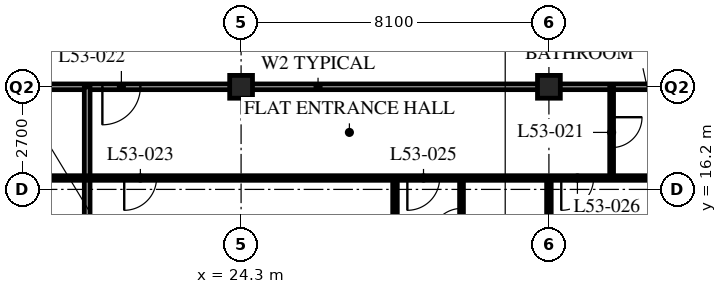
"""IFC4 building model, lengths in metres.
Left out: names, types, materials, properties, quantities, classifications, styles, units other than length and angle.
Written with IfcOpenShell. Run it as: python <this file> out.ifc"""

import sys

from ifc_helpers import new_model, si_unit, direction, frame, frame_2d, origin, origin_2d, place, context, subcontext, project, spatial, rectangle, hollow_rectangle, extrude, element, fill, save


model = new_model("IFC4")
c1 = context("Model", 3, precision=1e-05, world=origin(), true_north=direction((0.0, 1.0)))
c2 = subcontext(c1, "Body", "Model", "MODEL_VIEW")
j1 = project(units=[si_unit("LENGTHUNIT", "METRE"), si_unit("PLANEANGLEUNIT", "RADIAN")], contexts=[c1])
p1 = place(None, origin())
s1 = spatial("IfcSite", under=j1, at=p1, CompositionType="ELEMENT")
p2 = place(p1, origin())
s2 = spatial("IfcBuilding", under=s1, at=p2, CompositionType="ELEMENT")
p3 = place(p2, frame((0.0, 0.0, 206.4)))
s3 = spatial("IfcBuildingStorey", under=s2, at=p3, CompositionType="ELEMENT", Elevation=206.4)
for number, where, z_axis, x_axis in (
    (1, (24.3, 18.9, 0.0), (0.0, 0.0, 1.0), (1.0, 0.0, 0.0)),
    (2, (32.4, 18.9, 0.0), (0.0, 0.0, 1.0), (1.0, 0.0, 0.0)),
):
    element("IfcColumn", number, at=place(p3, frame(where, z_axis=z_axis, x_axis=x_axis)), inside=s3, PredefinedType="COLUMN", context=c2, shape_type="SweptSolid", body=[
        extrude(hollow_rectangle(XDim=0.6, YDim=0.6, WallThickness=0.05, at=origin_2d()), origin(), (0.0, 0.0, 1.0), 3.6),
    ])
p4 = place(p3, frame((8.1, 18.9, 0.0), z_axis=(0.0, 0.0, 1.0), x_axis=(1.0, 0.0, 0.0)))
e3 = element("IfcWall", 3, at=p4, inside=s3, PredefinedType="PARTITIONING", context=c2, shape_type="SweptSolid", body=[
    extrude(rectangle(XDim=36.45, YDim=0.15, at=frame_2d((18.225, 0.0))), origin(), (0.0, 0.0, 1.0), 2.778),
])
p5 = place(p4, frame((4.45, 0.0, 0.0)))
e4 = element("IfcOpeningElement", 4, at=p5, cuts=e3, PredefinedType="OPENING", context=c2, shape_type="SweptSolid", body=[
    extrude(rectangle(XDim=1.0, YDim=2.1, at=frame_2d((0.5, 1.05))), frame((0.0, 0.085, 0.0), z_axis=(0.0, -1.0, 0.0), x_axis=(1.0, 0.0, 0.0)), (0.0, 0.0, 1.0), 0.17),
])
p6 = place(p4, frame((12.55, 0.0, 0.0)))
e5 = element("IfcOpeningElement", 5, at=p6, cuts=e3, PredefinedType="OPENING", context=c2, shape_type="SweptSolid", body=[
    extrude(rectangle(XDim=1.0, YDim=2.1, at=frame_2d((0.5, 1.05))), frame((0.0, 0.085, 0.0), z_axis=(0.0, -1.0, 0.0), x_axis=(1.0, 0.0, 0.0)), (0.0, 0.0, 1.0), 0.17),
])
p7 = place(p4, frame((29.05, 0.0, 0.0)))
e6 = element("IfcOpeningElement", 6, at=p7, cuts=e3, PredefinedType="OPENING", context=c2, shape_type="SweptSolid", body=[
    extrude(rectangle(XDim=1.0, YDim=2.1, at=frame_2d((0.5, 1.05))), frame((0.0, 0.085, 0.0), z_axis=(0.0, -1.0, 0.0), x_axis=(1.0, 0.0, 0.0)), (0.0, 0.0, 1.0), 0.17),
])
p8 = place(p4, frame((2.625, 0.0, 0.0)))
e7 = element("IfcOpeningElement", 7, at=p8, cuts=e3, PredefinedType="OPENING", context=c2, shape_type="SweptSolid", body=[
    extrude(rectangle(XDim=1.0, YDim=2.1, at=frame_2d((0.5, 1.05))), frame((0.0, 0.085, 0.0), z_axis=(0.0, -1.0, 0.0), x_axis=(1.0, 0.0, 0.0)), (0.0, 0.0, 1.0), 0.17),
])
p9 = place(p4, frame((33.925, 0.0, 0.0)))
e8 = element("IfcOpeningElement", 8, at=p9, cuts=e3, PredefinedType="OPENING", context=c2, shape_type="SweptSolid", body=[
    extrude(rectangle(XDim=1.0, YDim=2.1, at=frame_2d((0.5, 1.05))), frame((0.0, 0.085, 0.0), z_axis=(0.0, -1.0, 0.0), x_axis=(1.0, 0.0, 0.0)), (0.0, 0.0, 1.0), 0.17),
])
p10 = place(p3, frame((20.25, 18.9, 0.0), z_axis=(0.0, 0.0, 1.0), x_axis=(0.0, -1.0, 0.0)))
e9 = element("IfcWall", 9, at=p10, inside=s3, PredefinedType="PARTITIONING", context=c2, shape_type="SweptSolid", body=[
    extrude(rectangle(XDim=7.8, YDim=0.15, at=frame_2d((3.9, 0.0))), origin(), (0.0, 0.0, 1.0), 3.39),
])
p11 = place(p3, frame((34.05, 18.9, 0.0), z_axis=(0.0, 0.0, 1.0), x_axis=(0.0, -1.0, 0.0)))
e10 = element("IfcWall", 10, at=p11, inside=s3, PredefinedType="PARTITIONING", context=c2, shape_type="SweptSolid", body=[
    extrude(rectangle(XDim=2.4, YDim=0.1, at=frame_2d((1.2, 0.0))), origin(), (0.0, 0.0, 1.0), 3.39),
])
p12 = place(p11, frame((0.8, 0.0, 0.0)))
e11 = element("IfcOpeningElement", 11, at=p12, cuts=e10, PredefinedType="OPENING", context=c2, shape_type="SweptSolid", body=[
    extrude(rectangle(XDim=0.8, YDim=2.1, at=frame_2d((0.4, 1.05))), frame((0.0, 0.06, 0.0), z_axis=(0.0, -1.0, 0.0), x_axis=(1.0, 0.0, 0.0)), (0.0, 0.0, 1.0), 0.12),
])
p13 = place(p3, frame((30.1, 16.5, 0.0), z_axis=(0.0, 0.0, 1.0), x_axis=(0.0, -1.0, 0.0)))
e12 = element("IfcWall", 12, at=p13, inside=s3, PredefinedType="PARTITIONING", context=c2, shape_type="SweptSolid", body=[
    extrude(rectangle(XDim=2.4, YDim=0.1, at=frame_2d((1.2, 0.0))), origin(), (0.0, 0.0, 1.0), 3.39),
])
p14 = place(p13, frame((0.8, 0.0, 0.0)))
e13 = element("IfcOpeningElement", 13, at=p14, cuts=e12, PredefinedType="OPENING", context=c2, shape_type="SweptSolid", body=[
    extrude(rectangle(XDim=0.8, YDim=2.1, at=frame_2d((0.4, 1.05))), frame((0.0, 0.06, 0.0), z_axis=(0.0, -1.0, 0.0), x_axis=(1.0, 0.0, 0.0)), (0.0, 0.0, 1.0), 0.12),
])
p15 = place(p3, frame((28.35, 16.5, 0.0), z_axis=(0.0, 0.0, 1.0), x_axis=(0.0, -1.0, 0.0)))
e14 = element("IfcWall", 14, at=p15, inside=s3, PredefinedType="PARTITIONING", context=c2, shape_type="SweptSolid", body=[
    extrude(rectangle(XDim=5.4, YDim=0.12, at=frame_2d((2.7, 0.0))), origin(), (0.0, 0.0, 1.0), 3.39),
])
p16 = place(p3, frame((32.4, 16.5, 0.0), z_axis=(0.0, 0.0, 1.0), x_axis=(0.0, -1.0, 0.0)))
e15 = element("IfcWall", 15, at=p16, inside=s3, PredefinedType="PARTITIONING", context=c2, shape_type="SweptSolid", body=[
    extrude(rectangle(XDim=5.4, YDim=0.12, at=frame_2d((2.7, 0.0))), origin(), (0.0, 0.0, 1.0), 2.778),
])
p17 = place(p3, frame((8.1, 16.5, 0.0), z_axis=(0.0, 0.0, 1.0), x_axis=(1.0, 0.0, 0.0)))
e16 = element("IfcWall", 16, at=p17, inside=s3, PredefinedType="PARTITIONING", context=c2, shape_type="SweptSolid", body=[
    extrude(rectangle(XDim=28.35, YDim=0.12, at=frame_2d((14.175, 0.0))), origin(), (0.0, 0.0, 1.0), 3.39),
])
p18 = place(p17, frame((5.025, 0.0, 0.0)))
e17 = element("IfcOpeningElement", 17, at=p18, cuts=e16, PredefinedType="OPENING", context=c2, shape_type="SweptSolid", body=[
    extrude(rectangle(XDim=0.85, YDim=2.1, at=frame_2d((0.425, 1.05))), frame((0.0, 0.07, 0.0), z_axis=(0.0, -1.0, 0.0), x_axis=(1.0, 0.0, 0.0)), (0.0, 0.0, 1.0), 0.14),
])
p19 = place(p17, frame((8.425, 0.0, 0.0)))
e18 = element("IfcOpeningElement", 18, at=p19, cuts=e16, PredefinedType="OPENING", context=c2, shape_type="SweptSolid", body=[
    extrude(rectangle(XDim=0.85, YDim=2.1, at=frame_2d((0.425, 1.05))), frame((0.0, 0.07, 0.0), z_axis=(0.0, -1.0, 0.0), x_axis=(1.0, 0.0, 0.0)), (0.0, 0.0, 1.0), 0.14),
])
p20 = place(p17, frame((13.125, 0.0, 0.0)))
e19 = element("IfcOpeningElement", 19, at=p20, cuts=e16, PredefinedType="OPENING", context=c2, shape_type="SweptSolid", body=[
    extrude(rectangle(XDim=0.85, YDim=2.1, at=frame_2d((0.425, 1.05))), frame((0.0, 0.07, 0.0), z_axis=(0.0, -1.0, 0.0), x_axis=(1.0, 0.0, 0.0)), (0.0, 0.0, 1.0), 0.14),
])
p21 = place(p17, frame((20.575, 0.0, 0.0)))
e20 = element("IfcOpeningElement", 20, at=p21, cuts=e16, PredefinedType="OPENING", context=c2, shape_type="SweptSolid", body=[
    extrude(rectangle(XDim=0.85, YDim=2.1, at=frame_2d((0.425, 1.05))), frame((0.0, 0.07, 0.0), z_axis=(0.0, -1.0, 0.0), x_axis=(1.0, 0.0, 0.0)), (0.0, 0.0, 1.0), 0.14),
])
p22 = place(p17, frame((24.625, 0.0, 0.0)))
e21 = element("IfcOpeningElement", 21, at=p22, cuts=e16, PredefinedType="OPENING", context=c2, shape_type="SweptSolid", body=[
    extrude(rectangle(XDim=0.85, YDim=2.1, at=frame_2d((0.425, 1.05))), frame((0.0, 0.07, 0.0), z_axis=(0.0, -1.0, 0.0), x_axis=(1.0, 0.0, 0.0)), (0.0, 0.0, 1.0), 0.14),
])
p23 = place(p17, frame((2.725, 0.0, 0.0)))
e22 = element("IfcOpeningElement", 22, at=p23, cuts=e16, PredefinedType="OPENING", context=c2, shape_type="SweptSolid", body=[
    extrude(rectangle(XDim=0.85, YDim=2.1, at=frame_2d((0.425, 1.05))), frame((0.0, 0.07, 0.0), z_axis=(0.0, -1.0, 0.0), x_axis=(1.0, 0.0, 0.0)), (0.0, 0.0, 1.0), 0.14),
])
p24 = place(p12, origin())
e23 = element("IfcDoor", 23, at=p24, inside=s3, OperationType="SINGLE_SWING_LEFT", PredefinedType="DOOR", context=c2, shape_type="SweptSolid", body=[
    extrude(rectangle(XDim=0.8, YDim=2.1, at=frame_2d((0.4, 1.05))), frame((0.0, 0.025, 0.0), z_axis=(0.0, -1.0, 0.0), x_axis=(1.0, 0.0, 0.0)), (0.0, 0.0, 1.0), 0.05),
])
fill(e11, e23)
p25 = place(p6, origin())
e24 = element("IfcDoor", 24, at=p25, inside=s3, OperationType="SINGLE_SWING_RIGHT", PredefinedType="DOOR", context=c2, shape_type="SweptSolid", body=[
    extrude(rectangle(XDim=1.0, YDim=2.1, at=frame_2d((0.5, 1.05))), frame((0.0, 0.025, 0.0), z_axis=(0.0, -1.0, 0.0), x_axis=(1.0, 0.0, 0.0)), (0.0, 0.0, 1.0), 0.05),
])
fill(e5, e24)
p26 = place(p20, origin())
e25 = element("IfcDoor", 25, at=p26, inside=s3, OperationType="SINGLE_SWING_RIGHT", PredefinedType="DOOR", context=c2, shape_type="SweptSolid", body=[
    extrude(rectangle(XDim=0.85, YDim=2.1, at=frame_2d((0.425, 1.05))), frame((0.0, 0.025, 0.0), z_axis=(0.0, -1.0, 0.0), x_axis=(1.0, 0.0, 0.0)), (0.0, 0.0, 1.0), 0.05),
])
fill(e19, e25)
p27 = place(p14, origin())
e26 = element("IfcDoor", 26, at=p27, inside=s3, OperationType="SINGLE_SWING_LEFT", PredefinedType="DOOR", context=c2, shape_type="SweptSolid", body=[
    extrude(rectangle(XDim=0.8, YDim=2.1, at=frame_2d((0.4, 1.05))), frame((0.0, 0.025, 0.0), z_axis=(0.0, -1.0, 0.0), x_axis=(1.0, 0.0, 0.0)), (0.0, 0.0, 1.0), 0.05),
])
fill(e13, e26)
p28 = place(p21, origin())
e27 = element("IfcDoor", 27, at=p28, inside=s3, OperationType="SINGLE_SWING_RIGHT", PredefinedType="DOOR", context=c2, shape_type="SweptSolid", body=[
    extrude(rectangle(XDim=0.85, YDim=2.1, at=frame_2d((0.425, 1.05))), frame((0.0, 0.025, 0.0), z_axis=(0.0, -1.0, 0.0), x_axis=(1.0, 0.0, 0.0)), (0.0, 0.0, 1.0), 0.05),
])
fill(e20, e27)
p29 = place(p22, origin())
e28 = element("IfcDoor", 28, at=p29, inside=s3, OperationType="SINGLE_SWING_RIGHT", PredefinedType="DOOR", context=c2, shape_type="SweptSolid", body=[
    extrude(rectangle(XDim=0.85, YDim=2.1, at=frame_2d((0.425, 1.05))), frame((0.0, 0.025, 0.0), z_axis=(0.0, -1.0, 0.0), x_axis=(1.0, 0.0, 0.0)), (0.0, 0.0, 1.0), 0.05),
])
fill(e21, e28)
save(model, sys.argv[1])
